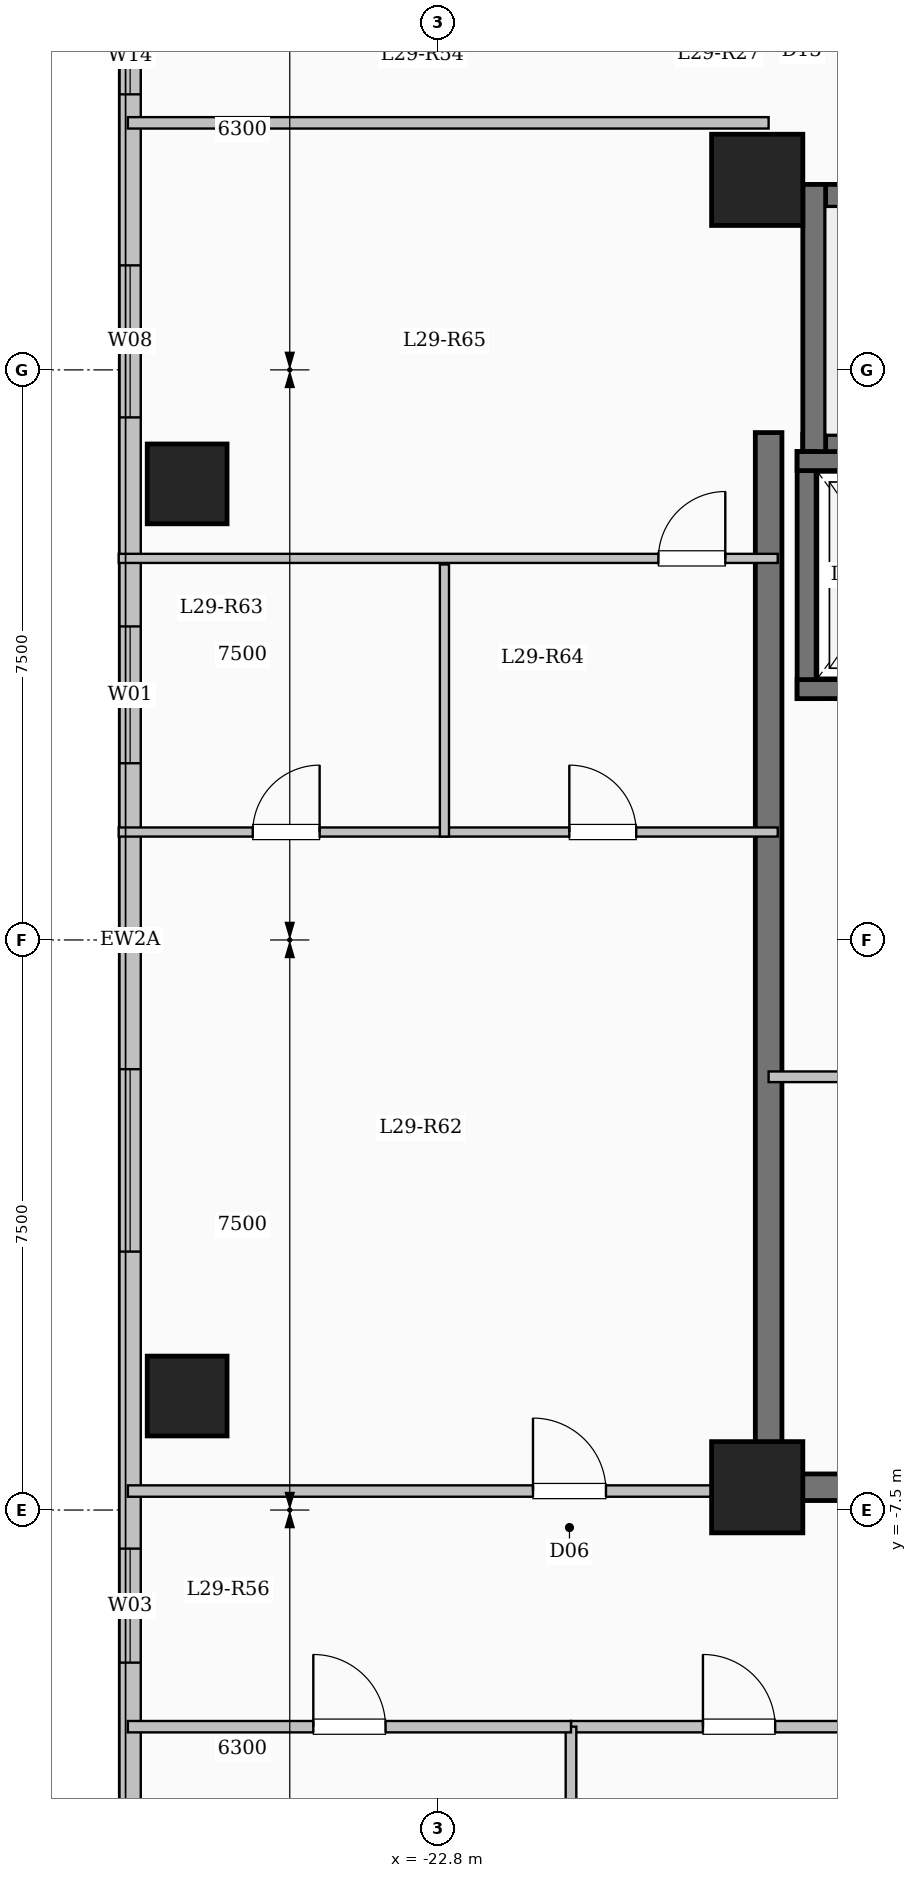
"""IFC4 building model, lengths in metres.
Left out: names, types, materials, properties, quantities, classifications, styles, units other than length and angle.
Written with IfcOpenShell. Run it as: python <this file> out.ifc"""

import sys

from ifc_helpers import new_model, si_unit, direction, frame, frame_2d, origin, origin_2d, place, context, subcontext, project, spatial, rectangle, extrude, element, fill, save


model = new_model("IFC4")
c1 = context("Model", 3, precision=1e-05, world=origin(), true_north=direction((0.0, 1.0)))
c2 = subcontext(c1, "Body", "Model", "MODEL_VIEW")
j1 = project(units=[si_unit("LENGTHUNIT", "METRE"), si_unit("PLANEANGLEUNIT", "RADIAN")], contexts=[c1])
p1 = place(None, origin())
s1 = spatial("IfcSite", under=j1, at=p1, CompositionType="ELEMENT")
p2 = place(p1, origin())
s2 = spatial("IfcBuilding", under=s1, at=p2, CompositionType="ELEMENT")
p3 = place(p2, frame((0.0, 0.0, 108.45)))
s3 = spatial("IfcBuildingStorey", under=s2, at=p3, CompositionType="ELEMENT", Elevation=108.45)
for number, where, z_axis, x_axis in (
    (1, (-18.6, -7.2, 0.0), (0.0, 0.0, 1.0), (1.0, 0.0, 0.0)),
    (2, (-18.6, 10.0, 0.0), (0.0, 0.0, 1.0), (1.0, 0.0, 0.0)),
):
    element("IfcColumn", number, at=place(p3, frame(where, z_axis=z_axis, x_axis=x_axis)), inside=s3, PredefinedType="COLUMN", context=c2, shape_type="SweptSolid", body=[
        extrude(rectangle(XDim=1.2, YDim=1.2, at=origin_2d()), origin(), (0.0, 0.0, 1.0), 3.35),
    ])
for number, where, z_axis, x_axis in (
    (3, (-26.1, -6.0, 0.0), (0.0, 0.0, 1.0), (1.0, 0.0, 0.0)),
    (4, (-26.1, 6.0, 0.0), (0.0, 0.0, 1.0), (1.0, 0.0, 0.0)),
):
    element("IfcColumn", number, at=place(p3, frame(where, z_axis=z_axis, x_axis=x_axis)), inside=s3, PredefinedType="COLUMN", context=c2, shape_type="SweptSolid", body=[
        extrude(rectangle(XDim=1.05, YDim=1.05, at=origin_2d()), origin(), (0.0, 0.0, 1.0), 3.35),
    ])
p4 = place(p3, frame((-26.85, -17.85, 0.0), z_axis=(0.0, 0.0, 1.0), x_axis=(0.0, 1.0, 0.0)))
e5 = element("IfcWall", 5, at=p4, inside=s3, PredefinedType="SOLIDWALL", context=c2, shape_type="SweptSolid", body=[
    extrude(rectangle(XDim=35.7, YDim=0.28, at=frame_2d((17.85, 0.0))), origin(), (0.0, 0.0, 1.0), 3.1),
])
p5 = place(p4, frame((2.55, 0.0, 0.9)))
e6 = element("IfcOpeningElement", 6, at=p5, cuts=e5, PredefinedType="OPENING", context=c2, shape_type="SweptSolid", body=[
    extrude(rectangle(XDim=2.4, YDim=1.8, at=frame_2d((1.2, 0.9))), frame((0.0, 0.15, 0.0), z_axis=(0.0, -1.0, 0.0), x_axis=(1.0, 0.0, 0.0)), (0.0, 0.0, 1.0), 0.3),
])
p6 = place(p4, frame((8.343, 0.0, 0.9)))
e7 = element("IfcOpeningElement", 7, at=p6, cuts=e5, PredefinedType="OPENING", context=c2, shape_type="SweptSolid", body=[
    extrude(rectangle(XDim=1.5, YDim=1.65, at=frame_2d((0.75, 0.825))), frame((0.0, 0.15, 0.0), z_axis=(0.0, -1.0, 0.0), x_axis=(1.0, 0.0, 0.0)), (0.0, 0.0, 1.0), 0.3),
])
p7 = place(p4, frame((13.75, 0.0, 0.9)))
e8 = element("IfcOpeningElement", 8, at=p7, cuts=e5, PredefinedType="OPENING", context=c2, shape_type="SweptSolid", body=[
    extrude(rectangle(XDim=2.4, YDim=1.8, at=frame_2d((1.2, 0.9))), frame((0.0, 0.15, 0.0), z_axis=(0.0, -1.0, 0.0), x_axis=(1.0, 0.0, 0.0)), (0.0, 0.0, 1.0), 0.3),
])
p8 = place(p4, frame((20.175, 0.0, 0.9)))
e9 = element("IfcOpeningElement", 9, at=p8, cuts=e5, PredefinedType="OPENING", context=c2, shape_type="SweptSolid", body=[
    extrude(rectangle(XDim=1.8, YDim=1.65, at=frame_2d((0.9, 0.825))), frame((0.0, 0.15, 0.0), z_axis=(0.0, -1.0, 0.0), x_axis=(1.0, 0.0, 0.0)), (0.0, 0.0, 1.0), 0.3),
])
p9 = place(p4, frame((24.725, 0.0, 0.9)))
e10 = element("IfcOpeningElement", 10, at=p9, cuts=e5, PredefinedType="OPENING", context=c2, shape_type="SweptSolid", body=[
    extrude(rectangle(XDim=2.0, YDim=1.7, at=frame_2d((1.0, 0.85))), frame((0.0, 0.15, 0.0), z_axis=(0.0, -1.0, 0.0), x_axis=(1.0, 0.0, 0.0)), (0.0, 0.0, 1.0), 0.3),
])
p10 = place(p4, frame((28.975, 0.0, 0.95)))
e11 = element("IfcOpeningElement", 11, at=p10, cuts=e5, PredefinedType="OPENING", context=c2, shape_type="SweptSolid", body=[
    extrude(rectangle(XDim=1.0, YDim=1.5, at=frame_2d((0.5, 0.75))), frame((0.0, 0.15, 0.0), z_axis=(0.0, -1.0, 0.0), x_axis=(1.0, 0.0, 0.0)), (0.0, 0.0, 1.0), 0.3),
])
p11 = place(p4, frame((32.025, 0.0, 0.9)))
e12 = element("IfcOpeningElement", 12, at=p11, cuts=e5, PredefinedType="OPENING", context=c2, shape_type="SweptSolid", body=[
    extrude(rectangle(XDim=2.0, YDim=1.7, at=frame_2d((1.0, 0.85))), frame((0.0, 0.15, 0.0), z_axis=(0.0, -1.0, 0.0), x_axis=(1.0, 0.0, 0.0)), (0.0, 0.0, 1.0), 0.3),
])
p12 = place(p3, frame((-18.0, 9.79, 0.0), z_axis=(0.0, 0.0, 1.0), x_axis=(1.0, 0.0, 0.0)))
e13 = element("IfcWall", 13, at=p12, inside=s3, PredefinedType="SHEAR", context=c2, shape_type="SweptSolid", body=[
    extrude(rectangle(XDim=8.0, YDim=0.3, at=frame_2d((4.0, 0.0))), origin(), (0.0, 0.0, 1.0), 3.35),
])
p13 = place(p3, frame((-18.0, 6.5, 0.0), z_axis=(0.0, 0.0, 1.0), x_axis=(1.0, 0.0, 0.0)))
e14 = element("IfcWall", 14, at=p13, inside=s3, PredefinedType="SHEAR", context=c2, shape_type="SweptSolid", body=[
    extrude(rectangle(XDim=8.0, YDim=0.3, at=frame_2d((4.0, 0.0))), origin(), (0.0, 0.0, 1.0), 3.35),
])
p14 = place(p13, frame((6.45, 0.0, 0.0)))
e15 = element("IfcOpeningElement", 15, at=p14, cuts=e14, PredefinedType="OPENING", context=c2, shape_type="SweptSolid", body=[
    extrude(rectangle(XDim=1.0, YDim=2.15, at=frame_2d((0.5, 1.075))), frame((0.0, 0.16, 0.0), z_axis=(0.0, -1.0, 0.0), x_axis=(1.0, 0.0, 0.0)), (0.0, 0.0, 1.0), 0.32),
])
p15 = place(p3, frame((-17.85, 6.35, 0.0), z_axis=(0.0, 0.0, 1.0), x_axis=(0.0, 1.0, 0.0)))
e16 = element("IfcWall", 16, at=p15, inside=s3, PredefinedType="SHEAR", context=c2, shape_type="SweptSolid", body=[
    extrude(rectangle(XDim=3.59, YDim=0.3, at=frame_2d((1.795, 0.0))), origin(), (0.0, 0.0, 1.0), 3.35),
])
p16 = place(p3, frame((-17.95, 3.175, 0.0), z_axis=(0.0, 0.0, 1.0), x_axis=(0.0, 1.0, 0.0)))
e17 = element("IfcWall", 17, at=p16, inside=s3, PredefinedType="SHEAR", context=c2, shape_type="SweptSolid", body=[
    extrude(rectangle(XDim=3.25, YDim=0.25, at=frame_2d((1.625, 0.0))), origin(), (0.0, 0.0, 1.0), 3.35),
])
for number, where, z_axis, x_axis in (
    (18, (-18.075, 3.3, 0.0), (0.0, 0.0, 1.0), (1.0, 0.0, 0.0)),
    (19, (-18.075, 6.3, 0.0), (0.0, 0.0, 1.0), (1.0, 0.0, 0.0)),
):
    element("IfcWall", number, at=place(p3, frame(where, z_axis=z_axis, x_axis=x_axis)), inside=s3, PredefinedType="SHEAR", context=c2, shape_type="SweptSolid", body=[
        extrude(rectangle(XDim=2.55, YDim=0.25, at=frame_2d((1.275, 0.0))), origin(), (0.0, 0.0, 1.0), 3.35),
    ])
p17 = place(p3, frame((-18.45, -7.375, 0.0), z_axis=(0.0, 0.0, 1.0), x_axis=(0.0, 1.0, 0.0)))
e20 = element("IfcWall", 20, at=p17, inside=s3, PredefinedType="SHEAR", context=c2, shape_type="SweptSolid", body=[
    extrude(rectangle(XDim=14.05, YDim=0.35, at=frame_2d((7.025, 0.0))), origin(), (0.0, 0.0, 1.0), 3.35),
])
p18 = place(p3, frame((-18.625, -7.2, 0.0), z_axis=(0.0, 0.0, 1.0), x_axis=(1.0, 0.0, 0.0)))
e21 = element("IfcWall", 21, at=p18, inside=s3, PredefinedType="SHEAR", context=c2, shape_type="SweptSolid", body=[
    extrude(rectangle(XDim=8.55, YDim=0.35, at=frame_2d((4.275, 0.0))), origin(), (0.0, 0.0, 1.0), 3.35),
])
p19 = place(p3, frame((-18.45, -1.8, 0.0), z_axis=(0.0, 0.0, 1.0), x_axis=(1.0, 0.0, 0.0)))
e22 = element("IfcWall", 22, at=p19, inside=s3, PredefinedType="PARTITIONING", context=c2, shape_type="SweptSolid", body=[
    extrude(rectangle(XDim=3.05, YDim=0.14, at=frame_2d((1.525, 0.0))), origin(), (0.0, 0.0, 1.0), 3.1),
])
p20 = place(p19, frame((1.05, 0.0, 0.0)))
e23 = element("IfcOpeningElement", 23, at=p20, cuts=e22, PredefinedType="OPENING", context=c2, shape_type="SweptSolid", body=[
    extrude(rectangle(XDim=0.9, YDim=2.08, at=frame_2d((0.45, 1.04))), frame((0.0, 0.08, 0.0), z_axis=(0.0, -1.0, 0.0), x_axis=(1.0, 0.0, 0.0)), (0.0, 0.0, 1.0), 0.16),
])
p21 = place(p3, frame((-21.05, -10.35, 0.0), z_axis=(0.0, 0.0, 1.0), x_axis=(1.0, 0.0, 0.0)))
e24 = element("IfcWall", 24, at=p21, inside=s3, PredefinedType="PARTITIONING", context=c2, shape_type="SweptSolid", body=[
    extrude(rectangle(XDim=12.5, YDim=0.15, at=frame_2d((6.25, 0.0))), origin(), (0.0, 0.0, 1.0), 3.1),
])
p22 = place(p21, frame((1.736, 0.0, 0.0)))
e25 = element("IfcOpeningElement", 25, at=p22, cuts=e24, PredefinedType="OPENING", context=c2, shape_type="SweptSolid", body=[
    extrude(rectangle(XDim=0.95, YDim=2.15, at=frame_2d((0.475, 1.075))), frame((0.0, 0.085, 0.0), z_axis=(0.0, -1.0, 0.0), x_axis=(1.0, 0.0, 0.0)), (0.0, 0.0, 1.0), 0.17),
])
p23 = place(p21, frame((6.248, 0.0, 0.0)))
e26 = element("IfcOpeningElement", 26, at=p23, cuts=e24, PredefinedType="OPENING", context=c2, shape_type="SweptSolid", body=[
    extrude(rectangle(XDim=0.95, YDim=2.15, at=frame_2d((0.475, 1.075))), frame((0.0, 0.085, 0.0), z_axis=(0.0, -1.0, 0.0), x_axis=(1.0, 0.0, 0.0)), (0.0, 0.0, 1.0), 0.17),
])
p24 = place(p21, frame((10.262, 0.0, 0.0)))
e27 = element("IfcOpeningElement", 27, at=p24, cuts=e24, PredefinedType="OPENING", context=c2, shape_type="SweptSolid", body=[
    extrude(rectangle(XDim=0.95, YDim=2.15, at=frame_2d((0.475, 1.075))), frame((0.0, 0.085, 0.0), z_axis=(0.0, -1.0, 0.0), x_axis=(1.0, 0.0, 0.0)), (0.0, 0.0, 1.0), 0.17),
])
p25 = place(p3, frame((-26.88, -7.25, 0.0), z_axis=(0.0, 0.0, 1.0), x_axis=(1.0, 0.0, 0.0)))
e28 = element("IfcWall", 28, at=p25, inside=s3, PredefinedType="PARTITIONING", context=c2, shape_type="SweptSolid", body=[
    extrude(rectangle(XDim=8.43, YDim=0.15, at=frame_2d((4.215, 0.0))), origin(), (0.0, 0.0, 1.0), 3.1),
])
p26 = place(p25, frame((5.33, 0.0, 0.0)))
e29 = element("IfcOpeningElement", 29, at=p26, cuts=e28, PredefinedType="OPENING", context=c2, shape_type="SweptSolid", body=[
    extrude(rectangle(XDim=0.96, YDim=2.15, at=frame_2d((0.48, 1.075))), frame((0.0, 0.085, 0.0), z_axis=(0.0, -1.0, 0.0), x_axis=(1.0, 0.0, 0.0)), (0.0, 0.0, 1.0), 0.17),
])
p27 = place(p3, frame((-26.88, 10.75, 0.0), z_axis=(0.0, 0.0, 1.0), x_axis=(1.0, 0.0, 0.0)))
e30 = element("IfcWall", 30, at=p27, inside=s3, PredefinedType="PARTITIONING", context=c2, shape_type="SweptSolid", body=[
    extrude(rectangle(XDim=8.43, YDim=0.15, at=frame_2d((4.215, 0.0))), origin(), (0.0, 0.0, 1.0), 3.1),
])
p28 = place(p3, frame((-21.05, -17.85, 0.0), z_axis=(0.0, 0.0, 1.0), x_axis=(0.0, 1.0, 0.0)))
e31 = element("IfcWall", 31, at=p28, inside=s3, PredefinedType="PARTITIONING", context=c2, shape_type="SweptSolid", body=[
    extrude(rectangle(XDim=7.5, YDim=0.14, at=frame_2d((3.75, 0.0))), origin(), (0.0, 0.0, 1.0), 3.1),
])
p29 = place(p3, frame((-26.88, -10.35, 0.0), z_axis=(0.0, 0.0, 1.0), x_axis=(1.0, 0.0, 0.0)))
e32 = element("IfcWall", 32, at=p29, inside=s3, PredefinedType="PARTITIONING", context=c2, shape_type="SweptSolid", body=[
    extrude(rectangle(XDim=5.83, YDim=0.15, at=frame_2d((2.915, 0.0))), origin(), (0.0, 0.0, 1.0), 3.1),
])
p30 = place(p29, frame((2.44, 0.0, 0.0)))
e33 = element("IfcOpeningElement", 33, at=p30, cuts=e32, PredefinedType="OPENING", context=c2, shape_type="SweptSolid", body=[
    extrude(rectangle(XDim=0.95, YDim=2.15, at=frame_2d((0.475, 1.075))), frame((0.0, 0.085, 0.0), z_axis=(0.0, -1.0, 0.0), x_axis=(1.0, 0.0, 0.0)), (0.0, 0.0, 1.0), 0.17),
])
p31 = place(p3, frame((-27.0, 1.42, 0.0), z_axis=(0.0, 0.0, 1.0), x_axis=(1.0, 0.0, 0.0)))
e34 = element("IfcWall", 34, at=p31, inside=s3, PredefinedType="PARTITIONING", context=c2, shape_type="SweptSolid", body=[
    extrude(rectangle(XDim=8.67, YDim=0.12, at=frame_2d((4.335, 0.0))), origin(), (0.0, 0.0, 1.0), 3.1),
])
p32 = place(p31, frame((1.763, 0.0, 0.0)))
e35 = element("IfcOpeningElement", 35, at=p32, cuts=e34, PredefinedType="OPENING", context=c2, shape_type="SweptSolid", body=[
    extrude(rectangle(XDim=0.88, YDim=2.1, at=frame_2d((0.44, 1.05))), frame((0.0, 0.07, 0.0), z_axis=(0.0, -1.0, 0.0), x_axis=(1.0, 0.0, 0.0)), (0.0, 0.0, 1.0), 0.14),
])
p33 = place(p31, frame((5.928, 0.0, 0.0)))
e36 = element("IfcOpeningElement", 36, at=p33, cuts=e34, PredefinedType="OPENING", context=c2, shape_type="SweptSolid", body=[
    extrude(rectangle(XDim=0.88, YDim=2.1, at=frame_2d((0.44, 1.05))), frame((0.0, 0.07, 0.0), z_axis=(0.0, -1.0, 0.0), x_axis=(1.0, 0.0, 0.0)), (0.0, 0.0, 1.0), 0.14),
])
p34 = place(p3, frame((-27.0, 5.02, 0.0), z_axis=(0.0, 0.0, 1.0), x_axis=(1.0, 0.0, 0.0)))
e37 = element("IfcWall", 37, at=p34, inside=s3, PredefinedType="PARTITIONING", context=c2, shape_type="SweptSolid", body=[
    extrude(rectangle(XDim=8.67, YDim=0.12, at=frame_2d((4.335, 0.0))), origin(), (0.0, 0.0, 1.0), 3.1),
])
p35 = place(p34, frame((7.1, 0.0, 0.0)))
e38 = element("IfcOpeningElement", 38, at=p35, cuts=e37, PredefinedType="OPENING", context=c2, shape_type="SweptSolid", body=[
    extrude(rectangle(XDim=0.88, YDim=2.1, at=frame_2d((0.44, 1.05))), frame((0.0, 0.07, 0.0), z_axis=(0.0, -1.0, 0.0), x_axis=(1.0, 0.0, 0.0)), (0.0, 0.0, 1.0), 0.14),
])
p36 = place(p3, frame((-22.715, 1.36, 0.0), z_axis=(0.0, 0.0, 1.0), x_axis=(0.0, 1.0, 0.0)))
e39 = element("IfcWall", 39, at=p36, inside=s3, PredefinedType="PARTITIONING", context=c2, shape_type="SweptSolid", body=[
    extrude(rectangle(XDim=3.58, YDim=0.12, at=frame_2d((1.79, 0.0))), origin(), (0.0, 0.0, 1.0), 3.1),
])
p37 = place(p6, origin())
e40 = element("IfcWindow", 40, at=p37, inside=s3, PartitioningType="SINGLE_PANEL", PredefinedType="WINDOW", context=c2, shape_type="SweptSolid", body=[
    extrude(rectangle(XDim=1.5, YDim=1.65, at=frame_2d((0.75, 0.825))), frame((0.0, 0.03, 0.0), z_axis=(0.0, -1.0, 0.0), x_axis=(1.0, 0.0, 0.0)), (0.0, 0.0, 1.0), 0.06),
])
fill(e7, e40)
p38 = place(p7, origin())
e41 = element("IfcWindow", 41, at=p38, inside=s3, PartitioningType="SINGLE_PANEL", PredefinedType="WINDOW", context=c2, shape_type="SweptSolid", body=[
    extrude(rectangle(XDim=2.4, YDim=1.8, at=frame_2d((1.2, 0.9))), frame((0.0, 0.03, 0.0), z_axis=(0.0, -1.0, 0.0), x_axis=(1.0, 0.0, 0.0)), (0.0, 0.0, 1.0), 0.06),
])
fill(e8, e41)
p39 = place(p8, origin())
e42 = element("IfcWindow", 42, at=p39, inside=s3, PartitioningType="SINGLE_PANEL", PredefinedType="WINDOW", context=c2, shape_type="SweptSolid", body=[
    extrude(rectangle(XDim=1.8, YDim=1.65, at=frame_2d((0.9, 0.825))), frame((0.0, 0.03, 0.0), z_axis=(0.0, -1.0, 0.0), x_axis=(1.0, 0.0, 0.0)), (0.0, 0.0, 1.0), 0.06),
])
fill(e9, e42)
p40 = place(p9, origin())
e43 = element("IfcWindow", 43, at=p40, inside=s3, PartitioningType="SINGLE_PANEL", PredefinedType="WINDOW", context=c2, shape_type="SweptSolid", body=[
    extrude(rectangle(XDim=2.0, YDim=1.7, at=frame_2d((1.0, 0.85))), frame((0.0, 0.03, 0.0), z_axis=(0.0, -1.0, 0.0), x_axis=(1.0, 0.0, 0.0)), (0.0, 0.0, 1.0), 0.06),
])
fill(e10, e43)
p41 = place(p10, origin())
e44 = element("IfcWindow", 44, at=p41, inside=s3, PartitioningType="SINGLE_PANEL", PredefinedType="WINDOW", context=c2, shape_type="SweptSolid", body=[
    extrude(rectangle(XDim=1.0, YDim=1.5, at=frame_2d((0.5, 0.75))), frame((0.0, 0.03, 0.0), z_axis=(0.0, -1.0, 0.0), x_axis=(1.0, 0.0, 0.0)), (0.0, 0.0, 1.0), 0.06),
])
fill(e11, e44)
p42 = place(p22, origin())
e45 = element("IfcDoor", 45, at=p42, inside=s3, OperationType="SINGLE_SWING_LEFT", PredefinedType="DOOR", context=c2, shape_type="SweptSolid", body=[
    extrude(rectangle(XDim=0.95, YDim=2.15, at=frame_2d((0.475, 1.075))), frame((0.0, 0.025, 0.0), z_axis=(0.0, -1.0, 0.0), x_axis=(1.0, 0.0, 0.0)), (0.0, 0.0, 1.0), 0.05),
])
fill(e25, e45)
p43 = place(p30, origin())
e46 = element("IfcDoor", 46, at=p43, inside=s3, OperationType="SINGLE_SWING_LEFT", PredefinedType="DOOR", context=c2, shape_type="SweptSolid", body=[
    extrude(rectangle(XDim=0.95, YDim=2.15, at=frame_2d((0.475, 1.075))), frame((0.0, 0.025, 0.0), z_axis=(0.0, -1.0, 0.0), x_axis=(1.0, 0.0, 0.0)), (0.0, 0.0, 1.0), 0.05),
])
fill(e33, e46)
p44 = place(p26, origin())
e47 = element("IfcDoor", 47, at=p44, inside=s3, OperationType="SINGLE_SWING_LEFT", PredefinedType="DOOR", context=c2, shape_type="SweptSolid", body=[
    extrude(rectangle(XDim=0.96, YDim=2.15, at=frame_2d((0.48, 1.075))), frame((0.0, 0.025, 0.0), z_axis=(0.0, -1.0, 0.0), x_axis=(1.0, 0.0, 0.0)), (0.0, 0.0, 1.0), 0.05),
])
fill(e29, e47)
p45 = place(p32, origin())
e48 = element("IfcDoor", 48, at=p45, inside=s3, OperationType="SINGLE_SWING_RIGHT", PredefinedType="DOOR", context=c2, shape_type="SweptSolid", body=[
    extrude(rectangle(XDim=0.88, YDim=2.1, at=frame_2d((0.44, 1.05))), frame((0.0, 0.025, 0.0), z_axis=(0.0, -1.0, 0.0), x_axis=(1.0, 0.0, 0.0)), (0.0, 0.0, 1.0), 0.05),
])
fill(e35, e48)
p46 = place(p33, origin())
e49 = element("IfcDoor", 49, at=p46, inside=s3, OperationType="SINGLE_SWING_LEFT", PredefinedType="DOOR", context=c2, shape_type="SweptSolid", body=[
    extrude(rectangle(XDim=0.88, YDim=2.1, at=frame_2d((0.44, 1.05))), frame((0.0, 0.025, 0.0), z_axis=(0.0, -1.0, 0.0), x_axis=(1.0, 0.0, 0.0)), (0.0, 0.0, 1.0), 0.05),
])
fill(e36, e49)
p47 = place(p35, origin())
e50 = element("IfcDoor", 50, at=p47, inside=s3, OperationType="SINGLE_SWING_RIGHT", PredefinedType="DOOR", context=c2, shape_type="SweptSolid", body=[
    extrude(rectangle(XDim=0.88, YDim=2.1, at=frame_2d((0.44, 1.05))), frame((0.0, 0.025, 0.0), z_axis=(0.0, -1.0, 0.0), x_axis=(1.0, 0.0, 0.0)), (0.0, 0.0, 1.0), 0.05),
])
fill(e38, e50)
save(model, sys.argv[1])
